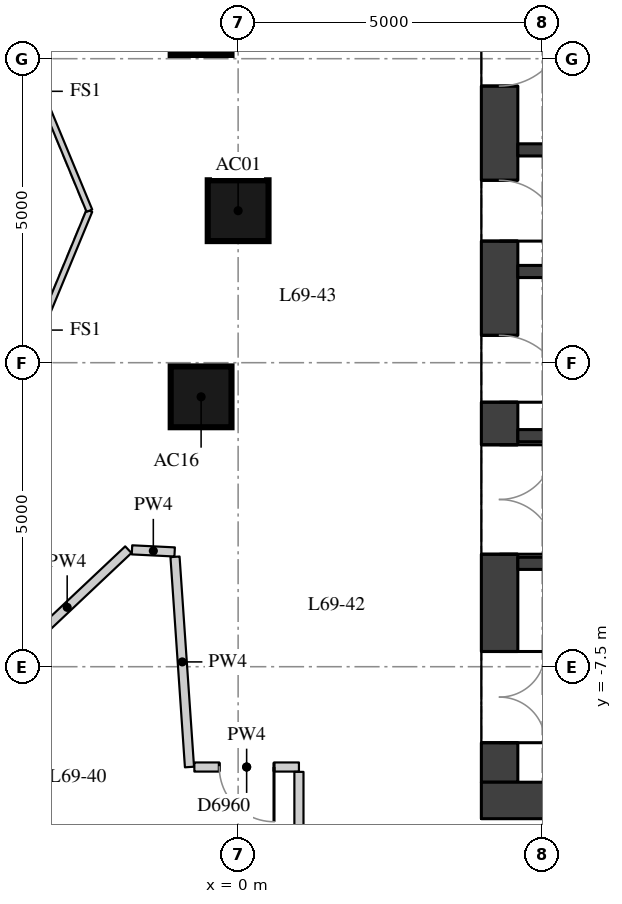
"""IFC4 building model, lengths in metres.
Left out: names, types, materials, properties, quantities, classifications, styles, units other than length and angle.
Written with IfcOpenShell. Run it as: python <this file> out.ifc"""

import sys

from ifc_helpers import new_model, si_unit, direction, frame, frame_2d, origin, origin_2d, place, context, subcontext, project, spatial, rectangle, extrude, element, fill, save


model = new_model("IFC4")
c1 = context("Model", 3, precision=1e-05, world=origin(), true_north=direction((0.0, 1.0)))
c2 = subcontext(c1, "Body", "Model", "MODEL_VIEW")
j1 = project(units=[si_unit("LENGTHUNIT", "METRE"), si_unit("PLANEANGLEUNIT", "RADIAN")], contexts=[c1])
p1 = place(None, origin())
s1 = spatial("IfcSite", under=j1, at=p1, CompositionType="ELEMENT")
p2 = place(p1, origin())
s2 = spatial("IfcBuilding", under=s1, at=p2, CompositionType="ELEMENT")
p3 = place(p2, frame((0.0, 0.0, 243.2)))
s3 = spatial("IfcBuildingStorey", under=s2, at=p3, CompositionType="ELEMENT", Elevation=243.2)
for number, where, z_axis, x_axis in (
    (1, (0.0, 0.0, 0.0), (0.0, 0.0, 1.0), (1.0, 0.0, 0.0)),
    (2, (-0.609, 3.062, 0.0), (0.0, 0.0, 1.0), (1.0, 0.0, 0.0)),
    (3, (-0.609, -3.062, 0.0), (0.0, 0.0, 1.0), (1.0, 0.0, 0.0)),
):
    element("IfcColumn", number, at=place(p3, frame(where, z_axis=z_axis, x_axis=x_axis)), inside=s3, PredefinedType="COLUMN", context=c2, shape_type="SweptSolid", body=[
        extrude(rectangle(XDim=1.0, YDim=1.0, at=origin_2d()), origin(), (0.0, 0.0, 1.0), 3.3),
    ])
p4 = place(p3, frame((4.3, -9.4, 0.0), z_axis=(0.0, 0.0, 1.0), x_axis=(0.0, 1.0, 0.0)))
e4 = element("IfcWall", 4, at=p4, inside=s3, PredefinedType="SHEAR", context=c2, shape_type="SweptSolid", body=[
    extrude(rectangle(XDim=18.8, YDim=0.6, at=frame_2d((9.4, 0.0))), origin(), (0.0, 0.0, 1.0), 3.02),
])
p5 = place(p4, frame((0.65, 0.0, 0.0)))
e5 = element("IfcOpeningElement", 5, at=p5, cuts=e4, PredefinedType="OPENING", context=c2, shape_type="SweptSolid", body=[
    extrude(rectangle(XDim=1.5, YDim=2.1, at=frame_2d((0.75, 1.05))), frame((0.0, 0.31, 0.0), z_axis=(0.0, -1.0, 0.0), x_axis=(1.0, 0.0, 0.0)), (0.0, 0.0, 1.0), 0.62),
])
p6 = place(p4, frame((3.75, 0.0, 0.0)))
e6 = element("IfcOpeningElement", 6, at=p6, cuts=e4, PredefinedType="OPENING", context=c2, shape_type="SweptSolid", body=[
    extrude(rectangle(XDim=1.8, YDim=2.1, at=frame_2d((0.9, 1.05))), frame((0.0, 0.31, 0.0), z_axis=(0.0, -1.0, 0.0), x_axis=(1.0, 0.0, 0.0)), (0.0, 0.0, 1.0), 0.62),
])
p7 = place(p4, frame((6.25, 0.0, 0.0)))
e7 = element("IfcOpeningElement", 7, at=p7, cuts=e4, PredefinedType="OPENING", context=c2, shape_type="SweptSolid", body=[
    extrude(rectangle(XDim=1.1, YDim=2.1, at=frame_2d((0.55, 1.05))), frame((0.0, 0.31, 0.0), z_axis=(0.0, -1.0, 0.0), x_axis=(1.0, 0.0, 0.0)), (0.0, 0.0, 1.0), 0.62),
])
p8 = place(p4, frame((8.9, 0.0, 0.0)))
e8 = element("IfcOpeningElement", 8, at=p8, cuts=e4, PredefinedType="OPENING", context=c2, shape_type="SweptSolid", body=[
    extrude(rectangle(XDim=1.0, YDim=2.1, at=frame_2d((0.5, 1.05))), frame((0.0, 0.31, 0.0), z_axis=(0.0, -1.0, 0.0), x_axis=(1.0, 0.0, 0.0)), (0.0, 0.0, 1.0), 0.62),
])
p9 = place(p4, frame((11.45, 0.0, 0.0)))
e9 = element("IfcOpeningElement", 9, at=p9, cuts=e4, PredefinedType="OPENING", context=c2, shape_type="SweptSolid", body=[
    extrude(rectangle(XDim=1.1, YDim=2.1, at=frame_2d((0.55, 1.05))), frame((0.0, 0.31, 0.0), z_axis=(0.0, -1.0, 0.0), x_axis=(1.0, 0.0, 0.0)), (0.0, 0.0, 1.0), 0.62),
])
p10 = place(p4, frame((13.25, 0.0, 0.0)))
e10 = element("IfcOpeningElement", 10, at=p10, cuts=e4, PredefinedType="OPENING", context=c2, shape_type="SweptSolid", body=[
    extrude(rectangle(XDim=1.8, YDim=2.1, at=frame_2d((0.9, 1.05))), frame((0.0, 0.31, 0.0), z_axis=(0.0, -1.0, 0.0), x_axis=(1.0, 0.0, 0.0)), (0.0, 0.0, 1.0), 0.62),
])
p11 = place(p4, frame((16.65, 0.0, 0.0)))
e11 = element("IfcOpeningElement", 11, at=p11, cuts=e4, PredefinedType="OPENING", context=c2, shape_type="SweptSolid", body=[
    extrude(rectangle(XDim=1.5, YDim=2.1, at=frame_2d((0.75, 1.05))), frame((0.0, 0.31, 0.0), z_axis=(0.0, -1.0, 0.0), x_axis=(1.0, 0.0, 0.0)), (0.0, 0.0, 1.0), 0.62),
])
p12 = place(p3, frame((4.0, -9.7, 0.0), z_axis=(0.0, 0.0, 1.0), x_axis=(1.0, 0.0, 0.0)))
e12 = element("IfcWall", 12, at=p12, inside=s3, PredefinedType="SHEAR", context=c2, shape_type="SweptSolid", body=[
    extrude(rectangle(XDim=12.0, YDim=0.6, at=frame_2d((6.0, 0.0))), origin(), (0.0, 0.0, 1.0), 3.02),
])
for number, where, z_axis, x_axis in (
    (13, (4.6, 1.0, 0.0), (0.0, 0.0, 1.0), (1.0, 0.0, 0.0)),
    (14, (4.6, -1.0, 0.0), (0.0, 0.0, 1.0), (1.0, 0.0, 0.0)),
):
    element("IfcWall", number, at=place(p3, frame(where, z_axis=z_axis, x_axis=x_axis)), inside=s3, PredefinedType="SHEAR", context=c2, shape_type="SweptSolid", body=[
        extrude(rectangle(XDim=10.8, YDim=0.2, at=frame_2d((5.4, 0.0))), origin(), (0.0, 0.0, 1.0), 3.02),
    ])
p13 = place(p3, frame((4.6, -3.7, 0.0), z_axis=(0.0, 0.0, 1.0), x_axis=(1.0, 0.0, 0.0)))
e15 = element("IfcWall", 15, at=p13, inside=s3, PredefinedType="SHEAR", context=c2, shape_type="SweptSolid", body=[
    extrude(rectangle(XDim=10.8, YDim=0.2, at=frame_2d((5.4, 0.0))), origin(), (0.0, 0.0, 1.0), 3.02),
])
p14 = place(p13, frame((6.6, 0.0, 0.0)))
e16 = element("IfcOpeningElement", 16, at=p14, cuts=e15, PredefinedType="OPENING", context=c2, shape_type="SweptSolid", body=[
    extrude(rectangle(XDim=1.1, YDim=2.1, at=frame_2d((0.55, 1.05))), frame((0.0, 0.11, 0.0), z_axis=(0.0, -1.0, 0.0), x_axis=(1.0, 0.0, 0.0)), (0.0, 0.0, 1.0), 0.22),
])
p15 = place(p13, frame((8.9, 0.0, 0.0)))
e17 = element("IfcOpeningElement", 17, at=p15, cuts=e15, PredefinedType="OPENING", context=c2, shape_type="SweptSolid", body=[
    extrude(rectangle(XDim=1.1, YDim=2.1, at=frame_2d((0.55, 1.05))), frame((0.0, 0.11, 0.0), z_axis=(0.0, -1.0, 0.0), x_axis=(1.0, 0.0, 0.0)), (0.0, 0.0, 1.0), 0.22),
])
p16 = place(p3, frame((4.6, -5.8, 0.0), z_axis=(0.0, 0.0, 1.0), x_axis=(1.0, 0.0, 0.0)))
e18 = element("IfcWall", 18, at=p16, inside=s3, PredefinedType="SHEAR", context=c2, shape_type="SweptSolid", body=[
    extrude(rectangle(XDim=10.8, YDim=0.2, at=frame_2d((5.4, 0.0))), origin(), (0.0, 0.0, 1.0), 3.02),
])
p17 = place(p3, frame((-3.817, -7.472, 0.0), z_axis=(0.0, 0.0, 1.0), x_axis=(0.727554143834, 0.686050266227, 0.0)))
e19 = element("IfcWall", 19, at=p17, inside=s3, PredefinedType="PARTITIONING", context=c2, shape_type="SweptSolid", body=[
    extrude(rectangle(XDim=2.765, YDim=0.15, at=frame_2d((1.382, 0.0))), origin(), (0.0, 0.0, 1.0), 3.02),
])
p18 = place(p3, frame((-1.746, -5.578, 0.0), z_axis=(0.0, 0.0, 1.0), x_axis=(0.998798699726, -0.049001606354, 0.0)))
e20 = element("IfcWall", 20, at=p18, inside=s3, PredefinedType="PARTITIONING", context=c2, shape_type="SweptSolid", body=[
    extrude(rectangle(XDim=0.702, YDim=0.15, at=frame_2d((0.351, 0.0))), origin(), (0.0, 0.0, 1.0), 3.02),
])
p19 = place(p3, frame((-1.038, -5.693, 0.0), z_axis=(0.0, 0.0, 1.0), x_axis=(0.068688454557, -0.997638158959, 0.0)))
e21 = element("IfcWall", 21, at=p19, inside=s3, PredefinedType="PARTITIONING", context=c2, shape_type="SweptSolid", body=[
    extrude(rectangle(XDim=3.466, YDim=0.15, at=frame_2d((1.733, 0.0))), origin(), (0.0, 0.0, 1.0), 3.02),
])
p20 = place(p3, frame((-0.72, -9.15, 0.0), z_axis=(0.0, 0.0, 1.0), x_axis=(1.0, 0.0, 0.0)))
e22 = element("IfcWall", 22, at=p20, inside=s3, PredefinedType="PARTITIONING", context=c2, shape_type="SweptSolid", body=[
    extrude(rectangle(XDim=1.72, YDim=0.15, at=frame_2d((0.86, 0.0))), origin(), (0.0, 0.0, 1.0), 3.02),
])
p21 = place(p20, frame((0.41, 0.0, 0.0)))
e23 = element("IfcOpeningElement", 23, at=p21, cuts=e22, PredefinedType="OPENING", context=c2, shape_type="SweptSolid", body=[
    extrude(rectangle(XDim=0.9, YDim=2.1, at=frame_2d((0.45, 1.05))), frame((0.0, 0.085, 0.0), z_axis=(0.0, -1.0, 0.0), x_axis=(1.0, 0.0, 0.0)), (0.0, 0.0, 1.0), 0.17),
])
p22 = place(p3, frame((1.0, -9.23, 0.0), z_axis=(0.0, 0.0, 1.0), x_axis=(0.0, -1.0, 0.0)))
e24 = element("IfcWall", 24, at=p22, inside=s3, PredefinedType="PARTITIONING", context=c2, shape_type="SweptSolid", body=[
    extrude(rectangle(XDim=2.283, YDim=0.15, at=frame_2d((1.142, 0.0))), origin(), (0.0, 0.0, 1.0), 3.02),
])
for number, where, z_axis, x_axis in (
    (25, (-2.446, 0.0, 0.0), (0.0, 0.0, 1.0), (-0.383, -0.924, 0.0)),
    (26, (-4.073, 3.927, 0.0), (0.0, 0.0, 1.0), (0.383, -0.924, 0.0)),
):
    element("IfcWall", number, at=place(p3, frame(where, z_axis=z_axis, x_axis=x_axis)), inside=s3, PredefinedType="PARTITIONING", context=c2, shape_type="SweptSolid", body=[
        extrude(rectangle(XDim=4.251, YDim=0.1, at=frame_2d((2.125, 0.0))), origin(), (0.0, 0.0, 1.0), 3.02),
    ])
p23 = place(p5, origin())
e27 = element("IfcDoor", 27, at=p23, inside=s3, OperationType="DOUBLE_DOOR_SINGLE_SWING", PredefinedType="DOOR", context=c2, shape_type="SweptSolid", body=[
    extrude(rectangle(XDim=1.5, YDim=2.1, at=frame_2d((0.75, 1.05))), frame((0.0, 0.025, 0.0), z_axis=(0.0, -1.0, 0.0), x_axis=(1.0, 0.0, 0.0)), (0.0, 0.0, 1.0), 0.05),
])
fill(e5, e27)
p24 = place(p6, origin())
e28 = element("IfcDoor", 28, at=p24, inside=s3, OperationType="DOUBLE_DOOR_SINGLE_SWING", PredefinedType="DOOR", context=c2, shape_type="SweptSolid", body=[
    extrude(rectangle(XDim=1.8, YDim=2.1, at=frame_2d((0.9, 1.05))), frame((0.0, 0.025, 0.0), z_axis=(0.0, -1.0, 0.0), x_axis=(1.0, 0.0, 0.0)), (0.0, 0.0, 1.0), 0.05),
])
fill(e6, e28)
p25 = place(p7, origin())
e29 = element("IfcDoor", 29, at=p25, inside=s3, OperationType="SINGLE_SWING_RIGHT", PredefinedType="DOOR", context=c2, shape_type="SweptSolid", body=[
    extrude(rectangle(XDim=1.1, YDim=2.1, at=frame_2d((0.55, 1.05))), frame((0.0, 0.025, 0.0), z_axis=(0.0, -1.0, 0.0), x_axis=(1.0, 0.0, 0.0)), (0.0, 0.0, 1.0), 0.05),
])
fill(e7, e29)
p26 = place(p8, origin())
e30 = element("IfcDoor", 30, at=p26, inside=s3, OperationType="SINGLE_SWING_RIGHT", PredefinedType="DOOR", context=c2, shape_type="SweptSolid", body=[
    extrude(rectangle(XDim=1.0, YDim=2.1, at=frame_2d((0.5, 1.05))), frame((0.0, 0.025, 0.0), z_axis=(0.0, -1.0, 0.0), x_axis=(1.0, 0.0, 0.0)), (0.0, 0.0, 1.0), 0.05),
])
fill(e8, e30)
p27 = place(p9, origin())
e31 = element("IfcDoor", 31, at=p27, inside=s3, OperationType="SINGLE_SWING_LEFT", PredefinedType="DOOR", context=c2, shape_type="SweptSolid", body=[
    extrude(rectangle(XDim=1.1, YDim=2.1, at=frame_2d((0.55, 1.05))), frame((0.0, 0.025, 0.0), z_axis=(0.0, -1.0, 0.0), x_axis=(1.0, 0.0, 0.0)), (0.0, 0.0, 1.0), 0.05),
])
fill(e9, e31)
p28 = place(p21, origin())
e32 = element("IfcDoor", 32, at=p28, inside=s3, OperationType="SINGLE_SWING_LEFT", PredefinedType="DOOR", context=c2, shape_type="SweptSolid", body=[
    extrude(rectangle(XDim=0.9, YDim=2.1, at=frame_2d((0.45, 1.05))), frame((0.0, 0.025, 0.0), z_axis=(0.0, -1.0, 0.0), x_axis=(1.0, 0.0, 0.0)), (0.0, 0.0, 1.0), 0.05),
])
fill(e23, e32)
save(model, sys.argv[1])
